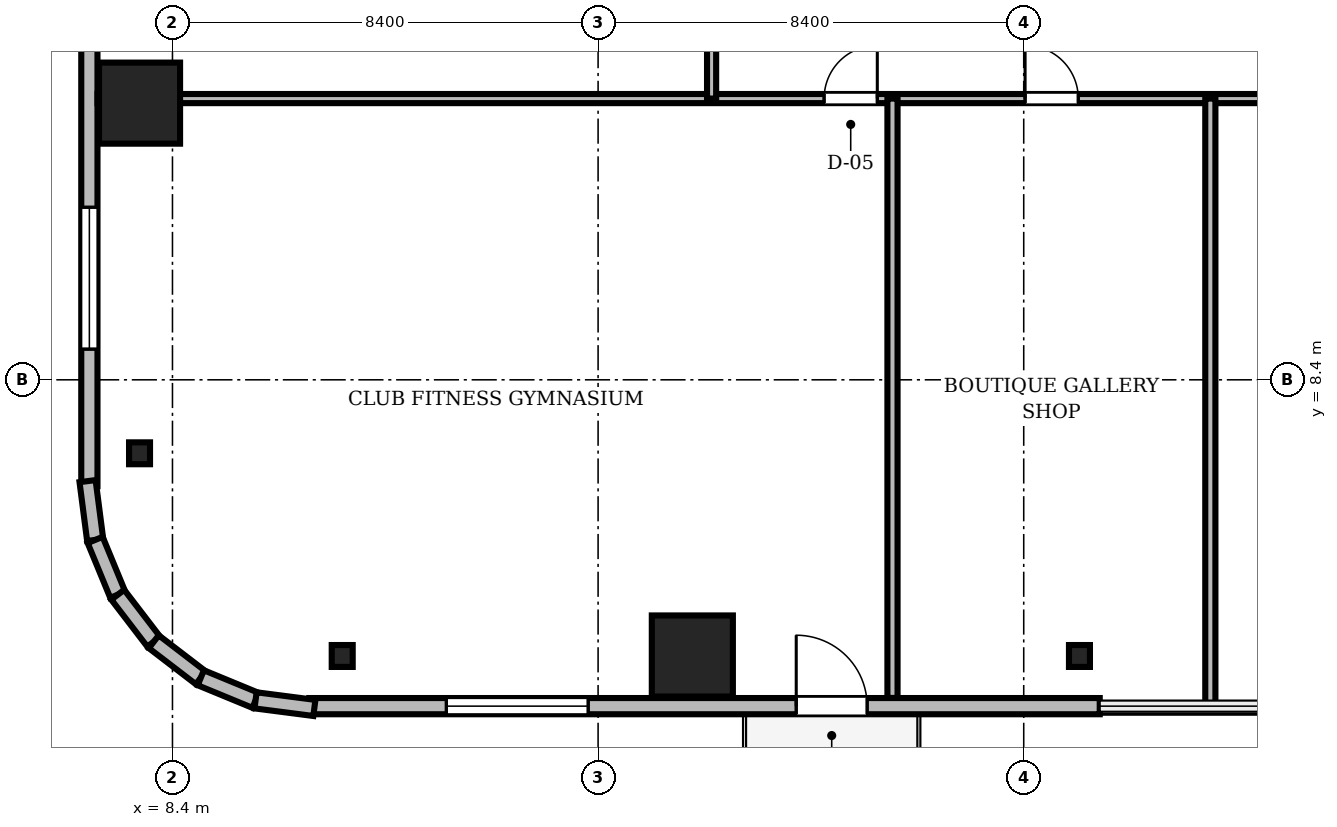
"""IFC4 building model, lengths in metres.
Left out: names, types, materials, properties, quantities, classifications, styles, units other than length and angle.
Written with IfcOpenShell. Run it as: python <this file> out.ifc"""

import sys

from ifc_helpers import new_model, si_unit, direction, frame, frame_2d, origin, origin_2d, place, context, subcontext, project, spatial, rectangle, i_section, extrude, source, transform, mapped, element, fill, save


model = new_model("IFC4")
c1 = context("Model", 3, precision=1e-05, world=origin(), true_north=direction((0.0, 1.0)))
c2 = subcontext(c1, "Body", "Model", "MODEL_VIEW")
j1 = project(units=[si_unit("LENGTHUNIT", "METRE"), si_unit("PLANEANGLEUNIT", "RADIAN")], contexts=[c1])
p1 = place(None, origin())
s1 = spatial("IfcSite", under=j1, at=p1, CompositionType="ELEMENT")
p2 = place(p1, origin())
s2 = spatial("IfcBuilding", under=s1, at=p2, CompositionType="ELEMENT")
p3 = place(p2, frame((0.0, 0.0, 118.7)))
s3 = spatial("IfcBuildingStorey", under=s2, at=p3, CompositionType="ELEMENT", Elevation=118.7)
m1 = source(origin(), c2, "Body", "SweptSolid", [
    extrude(rectangle(XDim=1.6, YDim=1.6, at=origin_2d()), origin(), (0.0, 0.0, 1.0), 3.46),
])
for number, where, z_axis, x_axis in (
    (1, (18.66, 2.95, 0.0), (0.0, 0.0, 1.0), (1.0, 0.0, 0.0)),
    (2, (7.75, 13.86, 0.0), (0.0, 0.0, 1.0), (1.0, 0.0, 0.0)),
):
    element("IfcColumn", number, at=place(p3, frame(where, z_axis=z_axis, x_axis=x_axis)), inside=s3, PredefinedType="COLUMN", context=c2, shape_type="MappedRepresentation", body=[
        mapped(m1, transform((0.0, 0.0, 0.0), scale=1.0)),
    ])
m2 = source(origin(), c2, "Body", "SweptSolid", [
    extrude(i_section(OverallWidth=0.414, OverallDepth=0.432, WebThickness=0.026, FlangeThickness=0.04, FilletRadius=0.015, at=origin_2d()), origin(), (0.0, 0.0, 1.0), 3.46),
])
for number, where, z_axis, x_axis in (
    (3, (11.75, 2.95, 0.0), (0.0, 0.0, 1.0), (1.0, 0.0, 0.0)),
    (4, (26.3, 2.95, 0.0), (0.0, 0.0, 1.0), (1.0, 0.0, 0.0)),
    (5, (7.75, 6.95, 0.0), (0.0, 0.0, 1.0), (1.0, 0.0, 0.0)),
):
    element("IfcColumn", number, at=place(p3, frame(where, z_axis=z_axis, x_axis=x_axis)), inside=s3, PredefinedType="COLUMN", context=c2, shape_type="MappedRepresentation", body=[
        mapped(m2, transform((0.0, 0.0, 0.0), scale=1.0)),
    ])
m3 = source(origin(), c2, "Body", "SweptSolid", [
    extrude(rectangle(XDim=15.6, YDim=0.32, at=frame_2d((7.8, 0.0))), origin(), (0.0, 0.0, 1.0), 3.46),
])
p4 = place(p3, frame((11.1, 1.96, 0.0), z_axis=(0.0, 0.0, 1.0), x_axis=(1.0, 0.0, 0.0)))
e6 = element("IfcWall", 6, at=p4, inside=s3, PredefinedType="SOLIDWALL", context=c2, shape_type="MappedRepresentation", body=[
    mapped(m3, transform((0.0, 0.0, 0.0), scale=1.0)),
])
m4 = source(origin(), c2, "Body", "SweptSolid", [
    extrude(rectangle(XDim=1.4, YDim=2.3, at=frame_2d((0.7, 1.15))), frame((0.0, 0.17, 0.0), z_axis=(0.0, -1.0, 0.0), x_axis=(1.0, 0.0, 0.0)), (0.0, 0.0, 1.0), 0.34),
])
p5 = place(p4, frame((9.61, 0.0, 0.0)))
e7 = element("IfcOpeningElement", 7, at=p5, cuts=e6, PredefinedType="OPENING", context=c2, shape_type="MappedRepresentation", body=[
    mapped(m4, transform((0.0, 0.0, 0.0), scale=1.0)),
])
m5 = source(origin(), c2, "Body", "SweptSolid", [
    extrude(rectangle(XDim=2.8, YDim=2.4, at=frame_2d((1.4, 1.2))), frame((0.0, 0.17, 0.0), z_axis=(0.0, -1.0, 0.0), x_axis=(1.0, 0.0, 0.0)), (0.0, 0.0, 1.0), 0.34),
])
p6 = place(p4, frame((2.705, 0.0, 0.72)))
e8 = element("IfcOpeningElement", 8, at=p6, cuts=e6, PredefinedType="OPENING", context=c2, shape_type="MappedRepresentation", body=[
    mapped(m5, transform((0.0, 0.0, 0.0), scale=1.0)),
])
p7 = place(p3, frame((6.76, 21.9, 0.0), z_axis=(0.0, 0.0, 1.0), x_axis=(0.0, -1.0, 0.0)))
e9 = element("IfcWall", 9, at=p7, inside=s3, PredefinedType="SOLIDWALL", context=c2, shape_type="MappedRepresentation", body=[
    mapped(m3, transform((0.0, 0.0, 0.0), scale=1.0)),
])
p8 = place(p7, frame((10.095, 0.0, 0.72)))
e10 = element("IfcOpeningElement", 10, at=p8, cuts=e9, PredefinedType="OPENING", context=c2, shape_type="MappedRepresentation", body=[
    mapped(m5, transform((0.0, 0.0, 0.0), scale=1.0)),
])
m6 = source(origin(), c2, "Body", "SweptSolid", [
    extrude(rectangle(XDim=1.171, YDim=0.32, at=frame_2d((0.585, 0.0))), origin(), (0.0, 0.0, 1.0), 3.46),
])
p9 = place(p3, frame((6.724, 6.401, 0.0), z_axis=(0.0, 0.0, 1.0), x_axis=(0.128269133229, -0.991739395941, 0.0)))
e11 = element("IfcWall", 11, at=p9, inside=s3, PredefinedType="SOLIDWALL", context=c2, shape_type="MappedRepresentation", body=[
    mapped(m6, transform((0.0, 0.0, 0.0), scale=1.0)),
])
m7 = source(origin(), c2, "Body", "SweptSolid", [
    extrude(rectangle(XDim=1.169, YDim=0.32, at=frame_2d((0.584, 0.0))), origin(), (0.0, 0.0, 1.0), 3.46),
])
for number, where, z_axis, x_axis in (
    (12, (6.875, 5.24, 0.0), (0.0, 0.0, 1.0), (0.381, -0.925, 0.0)),
    (13, (7.32, 4.159, 0.0), (0.0, 0.0, 1.0), (0.608, -0.794, 0.0)),
):
    element("IfcWall", number, at=place(p3, frame(where, z_axis=z_axis, x_axis=x_axis)), inside=s3, PredefinedType="SOLIDWALL", context=c2, shape_type="MappedRepresentation", body=[
        mapped(m7, transform((0.0, 0.0, 0.0), scale=1.0)),
    ])
m8 = source(origin(), c2, "Body", "SweptSolid", [
    extrude(rectangle(XDim=1.169, YDim=0.32, at=frame_2d((0.584, 0.0))), origin(), (0.0, 0.0, 1.0), 3.46),
])
p10 = place(p3, frame((8.031, 3.231, 0.0), z_axis=(0.0, 0.0, 1.0), x_axis=(0.793663520347, -0.608356981114, 0.0)))
e14 = element("IfcWall", 14, at=p10, inside=s3, PredefinedType="SOLIDWALL", context=c2, shape_type="MappedRepresentation", body=[
    mapped(m8, transform((0.0, 0.0, 0.0), scale=1.0)),
])
m9 = source(origin(), c2, "Body", "SweptSolid", [
    extrude(rectangle(XDim=1.169, YDim=0.32, at=frame_2d((0.585, 0.0))), origin(), (0.0, 0.0, 1.0), 3.46),
])
p11 = place(p3, frame((8.959, 2.52, 0.0), z_axis=(0.0, 0.0, 1.0), x_axis=(0.924479075121, -0.381232789334, 0.0)))
e15 = element("IfcWall", 15, at=p11, inside=s3, PredefinedType="SOLIDWALL", context=c2, shape_type="MappedRepresentation", body=[
    mapped(m9, transform((0.0, 0.0, 0.0), scale=1.0)),
])
m10 = source(origin(), c2, "Body", "SweptSolid", [
    extrude(rectangle(XDim=1.17, YDim=0.32, at=frame_2d((0.585, 0.0))), origin(), (0.0, 0.0, 1.0), 3.46),
])
p12 = place(p3, frame((10.04, 2.074, 0.0), z_axis=(0.0, 0.0, 1.0), x_axis=(0.991762485493, -0.128090485085, 0.0)))
e16 = element("IfcWall", 16, at=p12, inside=s3, PredefinedType="SOLIDWALL", context=c2, shape_type="MappedRepresentation", body=[
    mapped(m10, transform((0.0, 0.0, 0.0), scale=1.0)),
])
m11 = source(origin(), c2, "Body", "SweptSolid", [
    extrude(rectangle(XDim=46.156, YDim=0.18, at=frame_2d((23.078, 0.0))), origin(), (0.0, 0.0, 1.0), 2.702),
])
p13 = place(p3, frame((6.922, 13.95, 0.0), z_axis=(0.0, 0.0, 1.0), x_axis=(1.0, 0.0, 0.0)))
e17 = element("IfcWall", 17, at=p13, inside=s3, PredefinedType="PARTITIONING", context=c2, shape_type="MappedRepresentation", body=[
    mapped(m11, transform((0.0, 0.0, 0.0), scale=1.0)),
])
m12 = source(origin(), c2, "Body", "SweptSolid", [
    extrude(rectangle(XDim=1.05, YDim=2.2, at=frame_2d((0.525, 1.1))), frame((0.0, 0.1, 0.0), z_axis=(0.0, -1.0, 0.0), x_axis=(1.0, 0.0, 0.0)), (0.0, 0.0, 1.0), 0.2),
])
p14 = place(p13, frame((14.338, 0.0, 0.0)))
e18 = element("IfcOpeningElement", 18, at=p14, cuts=e17, PredefinedType="OPENING", context=c2, shape_type="MappedRepresentation", body=[
    mapped(m12, transform((0.0, 0.0, 0.0), scale=1.0)),
])
p15 = place(p13, frame((18.305, 0.0, 0.0)))
e19 = element("IfcOpeningElement", 19, at=p15, cuts=e17, PredefinedType="OPENING", context=c2, shape_type="MappedRepresentation", body=[
    mapped(m12, transform((0.0, 0.0, 0.0), scale=1.0)),
])
p16 = place(p13, frame((25.178, 0.0, 0.0)))
e20 = element("IfcOpeningElement", 20, at=p16, cuts=e17, PredefinedType="OPENING", context=c2, shape_type="MappedRepresentation", body=[
    mapped(m12, transform((0.0, 0.0, 0.0), scale=1.0)),
])
p17 = place(p13, frame((32.651, 0.0, 0.0)))
e21 = element("IfcOpeningElement", 21, at=p17, cuts=e17, PredefinedType="OPENING", context=c2, shape_type="MappedRepresentation", body=[
    mapped(m12, transform((0.0, 0.0, 0.0), scale=1.0)),
])
p18 = place(p13, frame((40.998, 0.0, 0.0)))
e22 = element("IfcOpeningElement", 22, at=p18, cuts=e17, PredefinedType="OPENING", context=c2, shape_type="MappedRepresentation", body=[
    mapped(m12, transform((0.0, 0.0, 0.0), scale=1.0)),
])
m13 = source(origin(), c2, "Body", "SweptSolid", [
    extrude(rectangle(XDim=14.6, YDim=0.18, at=frame_2d((7.3, 0.0))), origin(), (0.0, 0.0, 1.0), 2.852),
])
p19 = place(p3, frame((19.04, 13.95, 0.0), z_axis=(0.0, 0.0, 1.0), x_axis=(0.0, 1.0, 0.0)))
e23 = element("IfcWall", 23, at=p19, inside=s3, PredefinedType="PARTITIONING", context=c2, shape_type="MappedRepresentation", body=[
    mapped(m13, transform((0.0, 0.0, 0.0), scale=1.0)),
])
p20 = place(p19, frame((1.888, 0.0, 0.0)))
e24 = element("IfcOpeningElement", 24, at=p20, cuts=e23, PredefinedType="OPENING", context=c2, shape_type="MappedRepresentation", body=[
    mapped(m12, transform((0.0, 0.0, 0.0), scale=1.0)),
])
m14 = source(origin(), c2, "Body", "SweptSolid", [
    extrude(rectangle(XDim=0.95, YDim=2.15, at=frame_2d((0.475, 1.075))), frame((0.0, 0.1, 0.0), z_axis=(0.0, -1.0, 0.0), x_axis=(1.0, 0.0, 0.0)), (0.0, 0.0, 1.0), 0.2),
])
p21 = place(p19, frame((7.93, 0.0, 0.0)))
e25 = element("IfcOpeningElement", 25, at=p21, cuts=e23, PredefinedType="OPENING", context=c2, shape_type="MappedRepresentation", body=[
    mapped(m14, transform((0.0, 0.0, 0.0), scale=1.0)),
])
p22 = place(p19, frame((11.522, 0.0, 0.0)))
e26 = element("IfcOpeningElement", 26, at=p22, cuts=e23, PredefinedType="OPENING", context=c2, shape_type="MappedRepresentation", body=[
    mapped(m12, transform((0.0, 0.0, 0.0), scale=1.0)),
])
m15 = source(origin(), c2, "Body", "SweptSolid", [
    extrude(rectangle(XDim=11.828, YDim=0.2, at=frame_2d((5.914, 0.0))), origin(), (0.0, 0.0, 1.0), 2.702),
])
p23 = place(p3, frame((22.61, 2.122, 0.0), z_axis=(0.0, 0.0, 1.0), x_axis=(0.0, 1.0, 0.0)))
e27 = element("IfcWall", 27, at=p23, inside=s3, PredefinedType="PARTITIONING", context=c2, shape_type="MappedRepresentation", body=[
    mapped(m15, transform((0.0, 0.0, 0.0), scale=1.0)),
])
m16 = source(origin(), c2, "Body", "SweptSolid", [
    extrude(rectangle(XDim=12.02, YDim=0.2, at=frame_2d((6.01, 0.0))), origin(), (0.0, 0.0, 1.0), 2.702),
])
p24 = place(p3, frame((28.883, 1.93, 0.0), z_axis=(0.0, 0.0, 1.0), x_axis=(0.0, 1.0, 0.0)))
e28 = element("IfcWall", 28, at=p24, inside=s3, PredefinedType="PARTITIONING", context=c2, shape_type="MappedRepresentation", body=[
    mapped(m16, transform((0.0, 0.0, 0.0), scale=1.0)),
])
m17 = source(origin(), c2, "Body", "SweptSolid", [
    extrude(rectangle(XDim=1.4, YDim=2.3, at=frame_2d((0.7, 1.15))), frame((0.0, 0.025, 0.0), z_axis=(0.0, -1.0, 0.0), x_axis=(1.0, 0.0, 0.0)), (0.0, 0.0, 1.0), 0.05),
])
p25 = place(p5, frame((1.4, 0.0, 0.0), z_axis=(0.0, 0.0, 1.0), x_axis=(-1.0, 0.0, 0.0)))
e29 = element("IfcDoor", 29, at=p25, inside=s3, OperationType="DOUBLE_DOOR_SLIDING", PredefinedType="DOOR", context=c2, shape_type="MappedRepresentation", body=[
    mapped(m17, transform((0.0, 0.0, 0.0), scale=1.0)),
])
fill(e7, e29)
m18 = source(origin(), c2, "Body", "SweptSolid", [
    extrude(rectangle(XDim=2.8, YDim=2.4, at=frame_2d((1.4, 1.2))), frame((0.0, 0.03, 0.0), z_axis=(0.0, -1.0, 0.0), x_axis=(1.0, 0.0, 0.0)), (0.0, 0.0, 1.0), 0.06),
])
p26 = place(p6, origin())
e30 = element("IfcWindow", 30, at=p26, inside=s3, PartitioningType="SINGLE_PANEL", PredefinedType="WINDOW", context=c2, shape_type="MappedRepresentation", body=[
    mapped(m18, transform((0.0, 0.0, 0.0), scale=1.0)),
])
fill(e8, e30)
p27 = place(p8, origin())
e31 = element("IfcWindow", 31, at=p27, inside=s3, PartitioningType="SINGLE_PANEL", PredefinedType="WINDOW", context=c2, shape_type="MappedRepresentation", body=[
    mapped(m18, transform((0.0, 0.0, 0.0), scale=1.0)),
])
fill(e10, e31)
m19 = source(origin(), c2, "Body", "SweptSolid", [
    extrude(rectangle(XDim=1.05, YDim=2.2, at=frame_2d((0.525, 1.1))), frame((0.0, 0.025, 0.0), z_axis=(0.0, -1.0, 0.0), x_axis=(1.0, 0.0, 0.0)), (0.0, 0.0, 1.0), 0.05),
])
p28 = place(p14, origin())
e32 = element("IfcDoor", 32, at=p28, inside=s3, OperationType="SINGLE_SWING_RIGHT", PredefinedType="DOOR", context=c2, shape_type="MappedRepresentation", body=[
    mapped(m19, transform((0.0, 0.0, 0.0), scale=1.0)),
])
fill(e18, e32)
p29 = place(p15, origin())
e33 = element("IfcDoor", 33, at=p29, inside=s3, OperationType="SINGLE_SWING_LEFT", PredefinedType="DOOR", context=c2, shape_type="MappedRepresentation", body=[
    mapped(m19, transform((0.0, 0.0, 0.0), scale=1.0)),
])
fill(e19, e33)
save(model, sys.argv[1])
